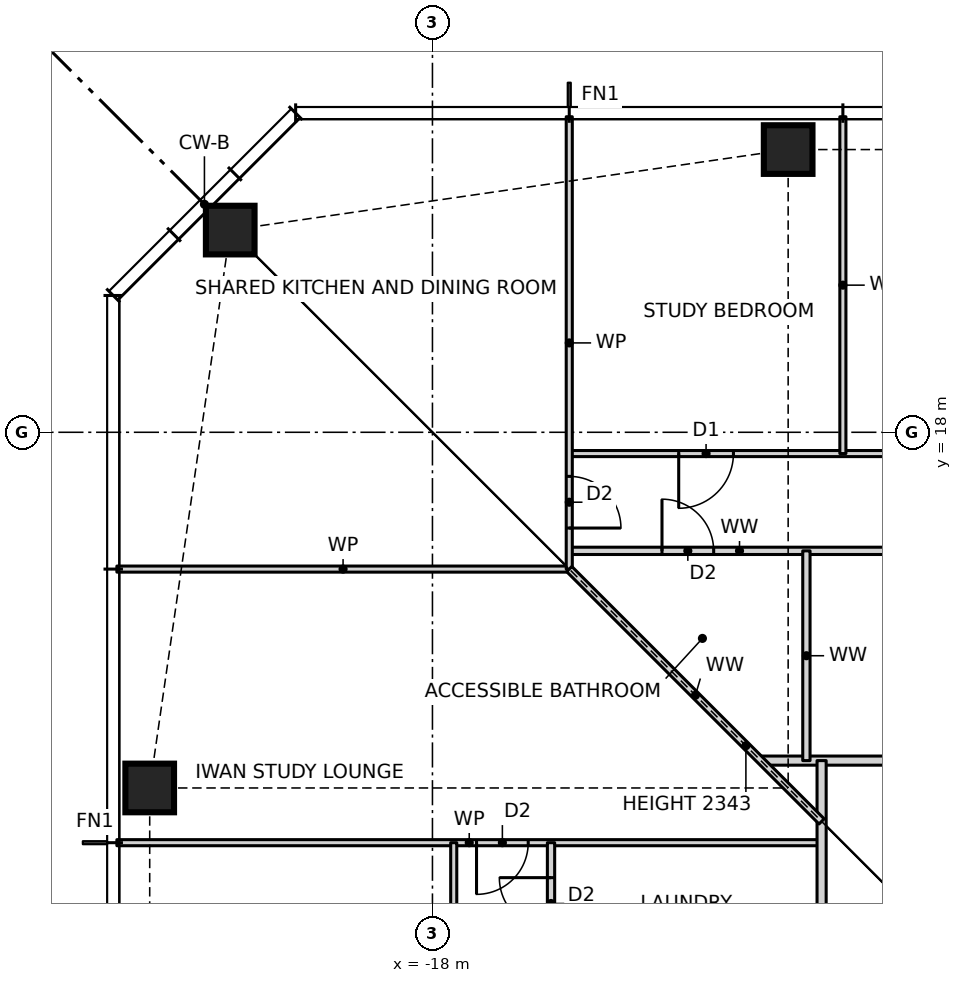
"""IFC4 building model, lengths in metres.
Left out: names, types, materials, properties, quantities, classifications, styles, units other than length and angle.
Written with IfcOpenShell. Run it as: python <this file> out.ifc"""

import sys

from ifc_helpers import new_model, si_unit, direction, frame, frame_2d, origin, origin_2d, place, context, subcontext, project, spatial, rectangle, hollow_rectangle, extrude, element, fill, save


model = new_model("IFC4")
c1 = context("Model", 3, precision=1e-05, world=origin(), true_north=direction((0.0, 1.0)))
c2 = subcontext(c1, "Body", "Model", "MODEL_VIEW")
j1 = project(units=[si_unit("LENGTHUNIT", "METRE"), si_unit("PLANEANGLEUNIT", "RADIAN")], contexts=[c1])
p1 = place(None, origin())
s1 = spatial("IfcSite", under=j1, at=p1, CompositionType="ELEMENT")
p2 = place(p1, origin())
s2 = spatial("IfcBuilding", under=s1, at=p2, CompositionType="ELEMENT")
p3 = place(p2, frame((0.0, 0.0, 43.0)))
s3 = spatial("IfcBuildingStorey", under=s2, at=p3, CompositionType="ELEMENT", Elevation=43.0)
for number, where, z_axis, x_axis in (
    (1, (-12.15, 22.65, 0.0), (0.0, 0.0, 1.0), (1.0, 0.0, 0.0)),
    (2, (-21.326, 21.326, 0.0), (0.0, 0.0, 1.0), (1.0, 0.0, 0.0)),
    (3, (-22.65, 12.15, 0.0), (0.0, 0.0, 1.0), (1.0, 0.0, 0.0)),
):
    element("IfcColumn", number, at=place(p3, frame(where, z_axis=z_axis, x_axis=x_axis)), inside=s3, PredefinedType="COLUMN", context=c2, shape_type="SweptSolid", body=[
        extrude(hollow_rectangle(XDim=0.8, YDim=0.8, WallThickness=0.09, at=origin_2d()), origin(), (0.0, 0.0, 1.0), 3.5),
    ])
p4 = place(p3, frame((-23.19, 11.25, 0.0), z_axis=(0.0, 0.0, 1.0), x_axis=(1.0, 0.0, 0.0)))
e4 = element("IfcWall", 4, at=p4, inside=s3, PredefinedType="PARTITIONING", context=c2, shape_type="SweptSolid", body=[
    extrude(rectangle(XDim=11.59, YDim=0.1, at=frame_2d((5.795, 0.0))), origin(), (0.0, 0.0, 1.0), 3.27),
])
p5 = place(p4, frame((5.915, 0.0, 0.0)))
e5 = element("IfcOpeningElement", 5, at=p5, cuts=e4, PredefinedType="OPENING", context=c2, shape_type="SweptSolid", body=[
    extrude(rectangle(XDim=0.85, YDim=2.1, at=frame_2d((0.425, 1.05))), frame((0.0, 0.06, 0.0), z_axis=(0.0, -1.0, 0.0), x_axis=(1.0, 0.0, 0.0)), (0.0, 0.0, 1.0), 0.12),
])
p6 = place(p3, frame((-12.6, 12.6, 0.0), z_axis=(0.0, 0.0, 1.0), x_axis=(1.0, 0.0, 0.0)))
e6 = element("IfcWall", 6, at=p6, inside=s3, PredefinedType="PARTITIONING", context=c2, shape_type="SweptSolid", body=[
    extrude(rectangle(XDim=25.2, YDim=0.15, at=frame_2d((12.6, 0.0))), origin(), (0.0, 0.0, 1.0), 3.27),
])
p7 = place(p6, frame((3.15, 0.0, 0.0)))
e7 = element("IfcOpeningElement", 7, at=p7, cuts=e6, PredefinedType="OPENING", context=c2, shape_type="SweptSolid", body=[
    extrude(rectangle(XDim=1.0, YDim=2.1, at=frame_2d((0.5, 1.05))), frame((0.0, 0.085, 0.0), z_axis=(0.0, -1.0, 0.0), x_axis=(1.0, 0.0, 0.0)), (0.0, 0.0, 1.0), 0.17),
])
p8 = place(p3, frame((-23.19, 15.75, 0.0), z_axis=(0.0, 0.0, 1.0), x_axis=(1.0, 0.0, 0.0)))
e8 = element("IfcWall", 8, at=p8, inside=s3, PredefinedType="PARTITIONING", context=c2, shape_type="SweptSolid", body=[
    extrude(rectangle(XDim=7.44, YDim=0.1, at=frame_2d((3.72, 0.0))), origin(), (0.0, 0.0, 1.0), 3.27),
])
p9 = place(p3, frame((-15.75, 16.05, 0.0), z_axis=(0.0, 0.0, 1.0), x_axis=(1.0, 0.0, 0.0)))
e9 = element("IfcWall", 9, at=p9, inside=s3, PredefinedType="PARTITIONING", context=c2, shape_type="SweptSolid", body=[
    extrude(rectangle(XDim=5.6, YDim=0.12, at=frame_2d((2.8, 0.0))), origin(), (0.0, 0.0, 1.0), 3.27),
])
p10 = place(p9, frame((1.525, 0.0, 0.0)))
e10 = element("IfcOpeningElement", 10, at=p10, cuts=e9, PredefinedType="OPENING", context=c2, shape_type="SweptSolid", body=[
    extrude(rectangle(XDim=0.85, YDim=2.1, at=frame_2d((0.425, 1.05))), frame((0.0, 0.07, 0.0), z_axis=(0.0, -1.0, 0.0), x_axis=(1.0, 0.0, 0.0)), (0.0, 0.0, 1.0), 0.14),
])
p11 = place(p3, frame((-15.75, 17.65, 0.0), z_axis=(0.0, 0.0, 1.0), x_axis=(1.0, 0.0, 0.0)))
e11 = element("IfcWall", 11, at=p11, inside=s3, PredefinedType="PARTITIONING", context=c2, shape_type="SweptSolid", body=[
    extrude(rectangle(XDim=31.5, YDim=0.1, at=frame_2d((15.75, 0.0))), origin(), (0.0, 0.0, 1.0), 3.27),
])
p12 = place(p11, frame((28.8, 0.0, 0.0)))
e12 = element("IfcOpeningElement", 12, at=p12, cuts=e11, PredefinedType="OPENING", context=c2, shape_type="SweptSolid", body=[
    extrude(rectangle(XDim=0.9, YDim=2.1, at=frame_2d((0.45, 1.05))), frame((0.0, 0.06, 0.0), z_axis=(0.0, -1.0, 0.0), x_axis=(1.0, 0.0, 0.0)), (0.0, 0.0, 1.0), 0.12),
])
p13 = place(p11, frame((24.3, 0.0, 0.0)))
e13 = element("IfcOpeningElement", 13, at=p13, cuts=e11, PredefinedType="OPENING", context=c2, shape_type="SweptSolid", body=[
    extrude(rectangle(XDim=0.9, YDim=2.1, at=frame_2d((0.45, 1.05))), frame((0.0, 0.06, 0.0), z_axis=(0.0, -1.0, 0.0), x_axis=(1.0, 0.0, 0.0)), (0.0, 0.0, 1.0), 0.12),
])
p14 = place(p11, frame((19.8, 0.0, 0.0)))
e14 = element("IfcOpeningElement", 14, at=p14, cuts=e11, PredefinedType="OPENING", context=c2, shape_type="SweptSolid", body=[
    extrude(rectangle(XDim=0.9, YDim=2.1, at=frame_2d((0.45, 1.05))), frame((0.0, 0.06, 0.0), z_axis=(0.0, -1.0, 0.0), x_axis=(1.0, 0.0, 0.0)), (0.0, 0.0, 1.0), 0.12),
])
p15 = place(p11, frame((15.3, 0.0, 0.0)))
e15 = element("IfcOpeningElement", 15, at=p15, cuts=e11, PredefinedType="OPENING", context=c2, shape_type="SweptSolid", body=[
    extrude(rectangle(XDim=0.9, YDim=2.1, at=frame_2d((0.45, 1.05))), frame((0.0, 0.06, 0.0), z_axis=(0.0, -1.0, 0.0), x_axis=(1.0, 0.0, 0.0)), (0.0, 0.0, 1.0), 0.12),
])
p16 = place(p11, frame((10.8, 0.0, 0.0)))
e16 = element("IfcOpeningElement", 16, at=p16, cuts=e11, PredefinedType="OPENING", context=c2, shape_type="SweptSolid", body=[
    extrude(rectangle(XDim=0.9, YDim=2.1, at=frame_2d((0.45, 1.05))), frame((0.0, 0.06, 0.0), z_axis=(0.0, -1.0, 0.0), x_axis=(1.0, 0.0, 0.0)), (0.0, 0.0, 1.0), 0.12),
])
p17 = place(p11, frame((6.3, 0.0, 0.0)))
e17 = element("IfcOpeningElement", 17, at=p17, cuts=e11, PredefinedType="OPENING", context=c2, shape_type="SweptSolid", body=[
    extrude(rectangle(XDim=0.9, YDim=2.1, at=frame_2d((0.45, 1.05))), frame((0.0, 0.06, 0.0), z_axis=(0.0, -1.0, 0.0), x_axis=(1.0, 0.0, 0.0)), (0.0, 0.0, 1.0), 0.12),
])
p18 = place(p11, frame((1.8, 0.0, 0.0)))
e18 = element("IfcOpeningElement", 18, at=p18, cuts=e11, PredefinedType="OPENING", context=c2, shape_type="SweptSolid", body=[
    extrude(rectangle(XDim=0.9, YDim=2.1, at=frame_2d((0.45, 1.05))), frame((0.0, 0.06, 0.0), z_axis=(0.0, -1.0, 0.0), x_axis=(1.0, 0.0, 0.0)), (0.0, 0.0, 1.0), 0.12),
])
p19 = place(p3, frame((-11.25, 17.65, 0.0), z_axis=(0.0, 0.0, 1.0), x_axis=(0.0, 1.0, 0.0)))
e19 = element("IfcWall", 19, at=p19, inside=s3, PredefinedType="PARTITIONING", context=c2, shape_type="SweptSolid", body=[
    extrude(rectangle(XDim=5.54, YDim=0.1, at=frame_2d((2.77, 0.0))), origin(), (0.0, 0.0, 1.0), 3.27),
])
p20 = place(p3, frame((-11.6, -11.6, 0.0), z_axis=(0.0, 0.0, 1.0), x_axis=(0.0, 1.0, 0.0)))
e20 = element("IfcWall", 20, at=p20, inside=s3, PredefinedType="PARTITIONING", context=c2, shape_type="SweptSolid", body=[
    extrude(rectangle(XDim=24.2, YDim=0.15, at=frame_2d((12.1, 0.0))), origin(), (0.0, 0.0, 1.0), 3.27),
])
p21 = place(p20, frame((12.14, 0.0, 0.0)))
e21 = element("IfcOpeningElement", 21, at=p21, cuts=e20, PredefinedType="OPENING", context=c2, shape_type="SweptSolid", body=[
    extrude(rectangle(XDim=1.0, YDim=2.1, at=frame_2d((0.5, 1.05))), frame((0.0, 0.085, 0.0), z_axis=(0.0, -1.0, 0.0), x_axis=(1.0, 0.0, 0.0)), (0.0, 0.0, 1.0), 0.17),
])
p22 = place(p3, frame((-11.85, 12.6, 0.0), z_axis=(0.0, 0.0, 1.0), x_axis=(0.0, 1.0, 0.0)))
e22 = element("IfcWall", 22, at=p22, inside=s3, PredefinedType="PARTITIONING", context=c2, shape_type="SweptSolid", body=[
    extrude(rectangle(XDim=3.45, YDim=0.12, at=frame_2d((1.725, 0.0))), origin(), (0.0, 0.0, 1.0), 3.27),
])
p23 = place(p3, frame((-15.75, 15.75, 0.0), z_axis=(0.0, 0.0, 1.0), x_axis=(0.0, 1.0, 0.0)))
e23 = element("IfcWall", 23, at=p23, inside=s3, PredefinedType="PARTITIONING", context=c2, shape_type="SweptSolid", body=[
    extrude(rectangle(XDim=7.44, YDim=0.1, at=frame_2d((3.72, 0.0))), origin(), (0.0, 0.0, 1.0), 3.27),
])
p24 = place(p23, frame((0.675, 0.0, 0.0)))
e24 = element("IfcOpeningElement", 24, at=p24, cuts=e23, PredefinedType="OPENING", context=c2, shape_type="SweptSolid", body=[
    extrude(rectangle(XDim=0.85, YDim=2.1, at=frame_2d((0.425, 1.05))), frame((0.0, 0.06, 0.0), z_axis=(0.0, -1.0, 0.0), x_axis=(1.0, 0.0, 0.0)), (0.0, 0.0, 1.0), 0.12),
])
p25 = place(p3, frame((-16.05, 6.15, 0.0), z_axis=(0.0, 0.0, 1.0), x_axis=(0.0, 1.0, 0.0)))
e25 = element("IfcWall", 25, at=p25, inside=s3, PredefinedType="PARTITIONING", context=c2, shape_type="SweptSolid", body=[
    extrude(rectangle(XDim=5.1, YDim=0.12, at=frame_2d((2.55, 0.0))), origin(), (0.0, 0.0, 1.0), 3.27),
])
p26 = place(p25, frame((3.675, 0.0, 0.0)))
e26 = element("IfcOpeningElement", 26, at=p26, cuts=e25, PredefinedType="OPENING", context=c2, shape_type="SweptSolid", body=[
    extrude(rectangle(XDim=0.85, YDim=2.1, at=frame_2d((0.425, 1.05))), frame((0.0, 0.07, 0.0), z_axis=(0.0, -1.0, 0.0), x_axis=(1.0, 0.0, 0.0)), (0.0, 0.0, 1.0), 0.14),
])
p27 = place(p25, frame((1.875, 0.0, 0.0)))
e27 = element("IfcOpeningElement", 27, at=p27, cuts=e25, PredefinedType="OPENING", context=c2, shape_type="SweptSolid", body=[
    extrude(rectangle(XDim=0.85, YDim=2.1, at=frame_2d((0.425, 1.05))), frame((0.0, 0.07, 0.0), z_axis=(0.0, -1.0, 0.0), x_axis=(1.0, 0.0, 0.0)), (0.0, 0.0, 1.0), 0.14),
])
p28 = place(p3, frame((-17.65, -15.75, 0.0), z_axis=(0.0, 0.0, 1.0), x_axis=(0.0, 1.0, 0.0)))
e28 = element("IfcWall", 28, at=p28, inside=s3, PredefinedType="PARTITIONING", context=c2, shape_type="SweptSolid", body=[
    extrude(rectangle(XDim=27.0, YDim=0.1, at=frame_2d((13.5, 0.0))), origin(), (0.0, 0.0, 1.0), 3.27),
])
p29 = place(p28, frame((24.3, 0.0, 0.0)))
e29 = element("IfcOpeningElement", 29, at=p29, cuts=e28, PredefinedType="OPENING", context=c2, shape_type="SweptSolid", body=[
    extrude(rectangle(XDim=0.9, YDim=2.1, at=frame_2d((0.45, 1.05))), frame((0.0, 0.06, 0.0), z_axis=(0.0, -1.0, 0.0), x_axis=(1.0, 0.0, 0.0)), (0.0, 0.0, 1.0), 0.12),
])
p30 = place(p28, frame((19.8, 0.0, 0.0)))
e30 = element("IfcOpeningElement", 30, at=p30, cuts=e28, PredefinedType="OPENING", context=c2, shape_type="SweptSolid", body=[
    extrude(rectangle(XDim=0.9, YDim=2.1, at=frame_2d((0.45, 1.05))), frame((0.0, 0.06, 0.0), z_axis=(0.0, -1.0, 0.0), x_axis=(1.0, 0.0, 0.0)), (0.0, 0.0, 1.0), 0.12),
])
p31 = place(p28, frame((15.3, 0.0, 0.0)))
e31 = element("IfcOpeningElement", 31, at=p31, cuts=e28, PredefinedType="OPENING", context=c2, shape_type="SweptSolid", body=[
    extrude(rectangle(XDim=0.9, YDim=2.1, at=frame_2d((0.45, 1.05))), frame((0.0, 0.06, 0.0), z_axis=(0.0, -1.0, 0.0), x_axis=(1.0, 0.0, 0.0)), (0.0, 0.0, 1.0), 0.12),
])
p32 = place(p28, frame((10.8, 0.0, 0.0)))
e32 = element("IfcOpeningElement", 32, at=p32, cuts=e28, PredefinedType="OPENING", context=c2, shape_type="SweptSolid", body=[
    extrude(rectangle(XDim=0.9, YDim=2.1, at=frame_2d((0.45, 1.05))), frame((0.0, 0.06, 0.0), z_axis=(0.0, -1.0, 0.0), x_axis=(1.0, 0.0, 0.0)), (0.0, 0.0, 1.0), 0.12),
])
p33 = place(p28, frame((6.3, 0.0, 0.0)))
e33 = element("IfcOpeningElement", 33, at=p33, cuts=e28, PredefinedType="OPENING", context=c2, shape_type="SweptSolid", body=[
    extrude(rectangle(XDim=0.9, YDim=2.1, at=frame_2d((0.45, 1.05))), frame((0.0, 0.06, 0.0), z_axis=(0.0, -1.0, 0.0), x_axis=(1.0, 0.0, 0.0)), (0.0, 0.0, 1.0), 0.12),
])
p34 = place(p28, frame((1.8, 0.0, 0.0)))
e34 = element("IfcOpeningElement", 34, at=p34, cuts=e28, PredefinedType="OPENING", context=c2, shape_type="SweptSolid", body=[
    extrude(rectangle(XDim=0.9, YDim=2.1, at=frame_2d((0.45, 1.05))), frame((0.0, 0.06, 0.0), z_axis=(0.0, -1.0, 0.0), x_axis=(1.0, 0.0, 0.0)), (0.0, 0.0, 1.0), 0.12),
])
p35 = place(p3, frame((-11.6, 11.6, 0.0), z_axis=(0.0, 0.0, 1.0), x_axis=(-0.707106781187, 0.707106781187, 0.0)))
e35 = element("IfcWall", 35, at=p35, inside=s3, PredefinedType="PARTITIONING", context=c2, shape_type="SweptSolid", body=[
    extrude(rectangle(XDim=5.869, YDim=0.12, at=frame_2d((2.935, 0.0))), origin(), (0.0, 0.0, 1.0), 2.343),
])
p36 = place(p18, frame((0.9, 0.0, 0.0), z_axis=(0.0, 0.0, 1.0), x_axis=(-1.0, 0.0, 0.0)))
e36 = element("IfcDoor", 36, at=p36, inside=s3, OperationType="SINGLE_SWING_RIGHT", PredefinedType="DOOR", context=c2, shape_type="SweptSolid", body=[
    extrude(rectangle(XDim=0.9, YDim=2.1, at=frame_2d((0.45, 1.05))), frame((0.0, 0.025, 0.0), z_axis=(0.0, -1.0, 0.0), x_axis=(1.0, 0.0, 0.0)), (0.0, 0.0, 1.0), 0.05),
])
fill(e18, e36)
p37 = place(p10, origin())
e37 = element("IfcDoor", 37, at=p37, inside=s3, OperationType="SINGLE_SWING_LEFT", PredefinedType="DOOR", context=c2, shape_type="SweptSolid", body=[
    extrude(rectangle(XDim=0.85, YDim=2.1, at=frame_2d((0.425, 1.05))), frame((0.0, 0.025, 0.0), z_axis=(0.0, -1.0, 0.0), x_axis=(1.0, 0.0, 0.0)), (0.0, 0.0, 1.0), 0.05),
])
fill(e10, e37)
p38 = place(p5, frame((0.85, 0.0, 0.0), z_axis=(0.0, 0.0, 1.0), x_axis=(-1.0, 0.0, 0.0)))
e38 = element("IfcDoor", 38, at=p38, inside=s3, OperationType="SINGLE_SWING_RIGHT", PredefinedType="DOOR", context=c2, shape_type="SweptSolid", body=[
    extrude(rectangle(XDim=0.85, YDim=2.1, at=frame_2d((0.425, 1.05))), frame((0.0, 0.025, 0.0), z_axis=(0.0, -1.0, 0.0), x_axis=(1.0, 0.0, 0.0)), (0.0, 0.0, 1.0), 0.05),
])
fill(e5, e38)
p39 = place(p26, origin())
e39 = element("IfcDoor", 39, at=p39, inside=s3, OperationType="SINGLE_SWING_RIGHT", PredefinedType="DOOR", context=c2, shape_type="SweptSolid", body=[
    extrude(rectangle(XDim=0.85, YDim=2.1, at=frame_2d((0.425, 1.05))), frame((0.0, 0.025, 0.0), z_axis=(0.0, -1.0, 0.0), x_axis=(1.0, 0.0, 0.0)), (0.0, 0.0, 1.0), 0.05),
])
fill(e26, e39)
p40 = place(p24, frame((0.85, 0.0, 0.0), z_axis=(0.0, 0.0, 1.0), x_axis=(-1.0, 0.0, 0.0)))
e40 = element("IfcDoor", 40, at=p40, inside=s3, OperationType="SINGLE_SWING_RIGHT", PredefinedType="DOOR", context=c2, shape_type="SweptSolid", body=[
    extrude(rectangle(XDim=0.85, YDim=2.1, at=frame_2d((0.425, 1.05))), frame((0.0, 0.025, 0.0), z_axis=(0.0, -1.0, 0.0), x_axis=(1.0, 0.0, 0.0)), (0.0, 0.0, 1.0), 0.05),
])
fill(e24, e40)
save(model, sys.argv[1])
